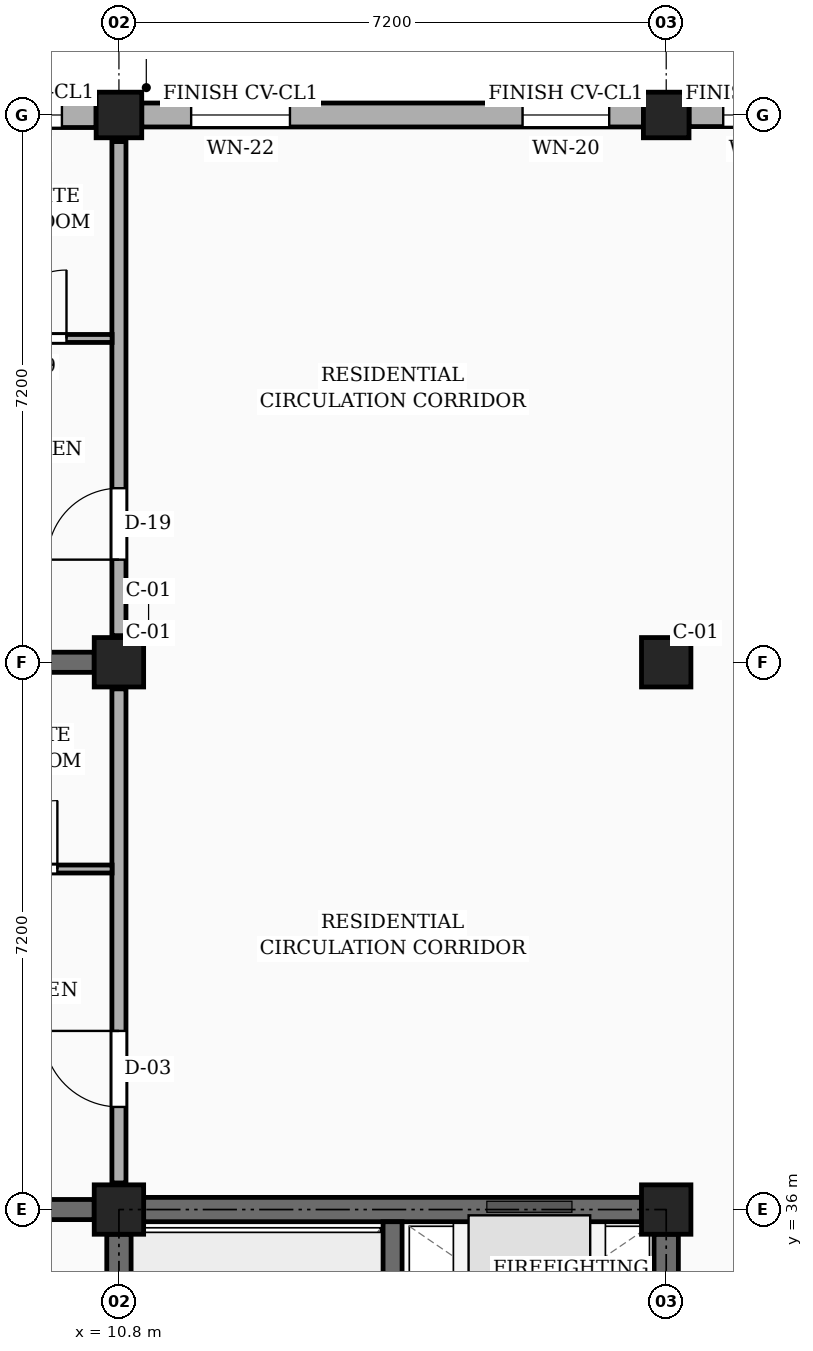
"""IFC4 building model, lengths in metres.
Left out: names, types, materials, properties, quantities, classifications, styles, units other than length and angle.
Written with IfcOpenShell. Run it as: python <this file> out.ifc"""

import sys

from ifc_helpers import new_model, si_unit, direction, frame, frame_2d, origin, origin_2d, place, context, subcontext, project, spatial, rectangle, extrude, element, fill, save


model = new_model("IFC4")
c1 = context("Model", 3, precision=1e-05, world=origin(), true_north=direction((0.0, 1.0)))
c2 = subcontext(c1, "Body", "Model", "MODEL_VIEW")
j1 = project(units=[si_unit("LENGTHUNIT", "METRE"), si_unit("PLANEANGLEUNIT", "RADIAN")], contexts=[c1])
p1 = place(None, origin())
s1 = spatial("IfcSite", under=j1, at=p1, CompositionType="ELEMENT")
p2 = place(p1, origin())
s2 = spatial("IfcBuilding", under=s1, at=p2, CompositionType="ELEMENT")
p3 = place(p2, origin())
s3 = spatial("IfcBuildingStorey", under=s2, at=p3, CompositionType="ELEMENT", Elevation=0.0)
for number, where, z_axis, x_axis in (
    (1, (10.8, 36.0, 0.0), (0.0, 0.0, 1.0), (1.0, 0.0, 0.0)),
    (2, (10.8, 43.2, 0.0), (0.0, 0.0, 1.0), (1.0, 0.0, 0.0)),
):
    element("IfcColumn", number, at=place(p3, frame(where, z_axis=z_axis, x_axis=x_axis)), inside=s3, PredefinedType="COLUMN", context=c2, shape_type="SweptSolid", body=[
        extrude(rectangle(XDim=0.65, YDim=0.65, at=origin_2d()), origin(), (0.0, 0.0, 1.0), 4.5),
    ])
p4 = place(p3, frame((10.8, 50.4, 0.0), z_axis=(0.0, 0.0, 1.0), x_axis=(1.0, 0.0, 0.0)))
e3 = element("IfcColumn", 3, at=p4, inside=s3, PredefinedType="COLUMN", context=c2, shape_type="SweptSolid", body=[
    extrude(rectangle(XDim=0.6, YDim=0.6, at=origin_2d()), origin(), (0.0, 0.0, 1.0), 4.5),
])
for number, where, z_axis, x_axis in (
    (4, (18.0, 36.0, 0.0), (0.0, 0.0, 1.0), (1.0, 0.0, 0.0)),
    (5, (18.0, 43.2, 0.0), (0.0, 0.0, 1.0), (1.0, 0.0, 0.0)),
):
    element("IfcColumn", number, at=place(p3, frame(where, z_axis=z_axis, x_axis=x_axis)), inside=s3, PredefinedType="COLUMN", context=c2, shape_type="SweptSolid", body=[
        extrude(rectangle(XDim=0.65, YDim=0.65, at=origin_2d()), origin(), (0.0, 0.0, 1.0), 4.5),
    ])
p5 = place(p3, frame((18.0, 50.4, 0.0), z_axis=(0.0, 0.0, 1.0), x_axis=(1.0, 0.0, 0.0)))
e6 = element("IfcColumn", 6, at=p5, inside=s3, PredefinedType="COLUMN", context=c2, shape_type="SweptSolid", body=[
    extrude(rectangle(XDim=0.6, YDim=0.6, at=origin_2d()), origin(), (0.0, 0.0, 1.0), 4.5),
])
for number, where, z_axis, x_axis in (
    (7, (3.9, 36.0, 0.0), (0.0, 0.0, 1.0), (1.0, 0.0, 0.0)),
    (8, (3.9, 43.2, 0.0), (0.0, 0.0, 1.0), (1.0, 0.0, 0.0)),
):
    element("IfcWall", number, at=place(p3, frame(where, z_axis=z_axis, x_axis=x_axis)), inside=s3, PredefinedType="SOLIDWALL", context=c2, shape_type="SweptSolid", body=[
        extrude(rectangle(XDim=6.575, YDim=0.265, at=frame_2d((3.288, 0.0))), origin(), (0.0, 0.0, 1.0), 3.52),
    ])
p6 = place(p3, frame((24.9, 50.4, 0.0), z_axis=(0.0, 0.0, 1.0), x_axis=(-1.0, 0.0, 0.0)))
e9 = element("IfcWall", 9, at=p6, inside=s3, PredefinedType="SOLIDWALL", context=c2, shape_type="SweptSolid", body=[
    extrude(rectangle(XDim=6.6, YDim=0.305, at=frame_2d((3.3, 0.0))), origin(), (0.0, 0.0, 1.0), 3.79),
])
p7 = place(p6, frame((2.61, 0.0, 0.78)))
e10 = element("IfcOpeningElement", 10, at=p7, cuts=e9, PredefinedType="OPENING", context=c2, shape_type="SweptSolid", body=[
    extrude(rectangle(XDim=0.98, YDim=1.36, at=frame_2d((0.49, 0.68))), frame((0.0, 0.163, 0.0), z_axis=(0.0, -1.0, 0.0), x_axis=(1.0, 0.0, 0.0)), (0.0, 0.0, 1.0), 0.325),
])
p8 = place(p6, frame((5.11, 0.0, 0.78)))
e11 = element("IfcOpeningElement", 11, at=p8, cuts=e9, PredefinedType="OPENING", context=c2, shape_type="SweptSolid", body=[
    extrude(rectangle(XDim=1.04, YDim=1.26, at=frame_2d((0.52, 0.63))), frame((0.0, 0.163, 0.0), z_axis=(0.0, -1.0, 0.0), x_axis=(1.0, 0.0, 0.0)), (0.0, 0.0, 1.0), 0.325),
])
p9 = place(p3, frame((17.7, 50.4, 0.0), z_axis=(0.0, 0.0, 1.0), x_axis=(-1.0, 0.0, 0.0)))
e12 = element("IfcWall", 12, at=p9, inside=s3, PredefinedType="SOLIDWALL", context=c2, shape_type="SweptSolid", body=[
    extrude(rectangle(XDim=6.6, YDim=0.315, at=frame_2d((3.3, 0.0))), origin(), (0.0, 0.0, 1.0), 3.79),
])
p10 = place(p9, frame((0.45, 0.0, 0.78)))
e13 = element("IfcOpeningElement", 13, at=p10, cuts=e12, PredefinedType="OPENING", context=c2, shape_type="SweptSolid", body=[
    extrude(rectangle(XDim=1.14, YDim=1.36, at=frame_2d((0.57, 0.68))), frame((0.0, 0.167, 0.0), z_axis=(0.0, -1.0, 0.0), x_axis=(1.0, 0.0, 0.0)), (0.0, 0.0, 1.0), 0.335),
])
p11 = place(p9, frame((4.65, 0.0, 0.78)))
e14 = element("IfcOpeningElement", 14, at=p11, cuts=e12, PredefinedType="OPENING", context=c2, shape_type="SweptSolid", body=[
    extrude(rectangle(XDim=1.3, YDim=1.36, at=frame_2d((0.65, 0.68))), frame((0.0, 0.167, 0.0), z_axis=(0.0, -1.0, 0.0), x_axis=(1.0, 0.0, 0.0)), (0.0, 0.0, 1.0), 0.335),
])
p12 = place(p3, frame((10.5, 50.4, 0.0), z_axis=(0.0, 0.0, 1.0), x_axis=(-1.0, 0.0, 0.0)))
e15 = element("IfcWall", 15, at=p12, inside=s3, PredefinedType="SOLIDWALL", context=c2, shape_type="SweptSolid", body=[
    extrude(rectangle(XDim=6.64, YDim=0.33, at=frame_2d((3.32, 0.0))), origin(), (0.0, 0.0, 1.0), 3.79),
])
p13 = place(p12, frame((0.45, 0.0, 0.78)))
e16 = element("IfcOpeningElement", 16, at=p13, cuts=e15, PredefinedType="OPENING", context=c2, shape_type="SweptSolid", body=[
    extrude(rectangle(XDim=1.2, YDim=1.26, at=frame_2d((0.6, 0.63))), frame((0.0, 0.175, 0.0), z_axis=(0.0, -1.0, 0.0), x_axis=(1.0, 0.0, 0.0)), (0.0, 0.0, 1.0), 0.35),
])
p14 = place(p12, frame((3.5, 0.0, 0.78)))
e17 = element("IfcOpeningElement", 17, at=p14, cuts=e15, PredefinedType="OPENING", context=c2, shape_type="SweptSolid", body=[
    extrude(rectangle(XDim=1.46, YDim=1.36, at=frame_2d((0.73, 0.68))), frame((0.0, 0.175, 0.0), z_axis=(0.0, -1.0, 0.0), x_axis=(1.0, 0.0, 0.0)), (0.0, 0.0, 1.0), 0.35),
])
for number, where, z_axis, x_axis in (
    (18, (10.8, 29.125, 0.0), (0.0, 0.0, 1.0), (0.0, 1.0, 0.0)),
    (19, (11.125, 36.0, 0.0), (0.0, 0.0, 1.0), (1.0, 0.0, 0.0)),
):
    element("IfcWall", number, at=place(p3, frame(where, z_axis=z_axis, x_axis=x_axis)), inside=s3, PredefinedType="SHEAR", context=c2, shape_type="SweptSolid", body=[
        extrude(rectangle(XDim=6.55, YDim=0.32, at=frame_2d((3.275, 0.0))), origin(), (0.0, 0.0, 1.0), 4.22),
    ])
p15 = place(p3, frame((18.0, 29.125, 0.0), z_axis=(0.0, 0.0, 1.0), x_axis=(0.0, 1.0, 0.0)))
e20 = element("IfcWall", 20, at=p15, inside=s3, PredefinedType="SHEAR", context=c2, shape_type="SweptSolid", body=[
    extrude(rectangle(XDim=6.55, YDim=0.32, at=frame_2d((3.275, 0.0))), origin(), (0.0, 0.0, 1.0), 4.22),
])
p16 = place(p15, frame((1.5, 0.0, 0.0)))
e21 = element("IfcOpeningElement", 21, at=p16, cuts=e20, PredefinedType="OPENING", context=c2, shape_type="SweptSolid", body=[
    extrude(rectangle(XDim=1.1, YDim=2.15, at=frame_2d((0.55, 1.075))), frame((0.0, 0.17, 0.0), z_axis=(0.0, -1.0, 0.0), x_axis=(1.0, 0.0, 0.0)), (0.0, 0.0, 1.0), 0.34),
])
p17 = place(p3, frame((14.4, 28.96, 0.0), z_axis=(0.0, 0.0, 1.0), x_axis=(0.0, 1.0, 0.0)))
e22 = element("IfcWall", 22, at=p17, inside=s3, PredefinedType="SHEAR", context=c2, shape_type="SweptSolid", body=[
    extrude(rectangle(XDim=6.88, YDim=0.25, at=frame_2d((3.44, 0.0))), origin(), (0.0, 0.0, 1.0), 4.22),
])
p18 = place(p17, frame((0.44, 0.0, 0.0)))
e23 = element("IfcOpeningElement", 23, at=p18, cuts=e22, PredefinedType="OPENING", context=c2, shape_type="SweptSolid", body=[
    extrude(rectangle(XDim=1.05, YDim=2.15, at=frame_2d((0.525, 1.075))), frame((0.0, 0.135, 0.0), z_axis=(0.0, -1.0, 0.0), x_axis=(1.0, 0.0, 0.0)), (0.0, 0.0, 1.0), 0.27),
])
p19 = place(p3, frame((10.8, 36.35, 0.0), z_axis=(0.0, 0.0, 1.0), x_axis=(0.0, 1.0, 0.0)))
e24 = element("IfcWall", 24, at=p19, inside=s3, PredefinedType="PARTITIONING", context=c2, shape_type="SweptSolid", body=[
    extrude(rectangle(XDim=6.5, YDim=0.185, at=frame_2d((3.25, 0.0))), origin(), (0.0, 0.0, 1.0), 3.47),
])
p20 = place(p19, frame((1.0, 0.0, 0.0)))
e25 = element("IfcOpeningElement", 25, at=p20, cuts=e24, PredefinedType="OPENING", context=c2, shape_type="SweptSolid", body=[
    extrude(rectangle(XDim=1.0, YDim=2.15, at=frame_2d((0.5, 1.075))), frame((0.0, 0.103, 0.0), z_axis=(0.0, -1.0, 0.0), x_axis=(1.0, 0.0, 0.0)), (0.0, 0.0, 1.0), 0.205),
])
p21 = place(p3, frame((10.8, 43.55, 0.0), z_axis=(0.0, 0.0, 1.0), x_axis=(0.0, 1.0, 0.0)))
e26 = element("IfcWall", 26, at=p21, inside=s3, PredefinedType="PARTITIONING", context=c2, shape_type="SweptSolid", body=[
    extrude(rectangle(XDim=6.5, YDim=0.185, at=frame_2d((3.25, 0.0))), origin(), (0.0, 0.0, 1.0), 3.47),
])
p22 = place(p21, frame((1.0, 0.0, 0.0)))
e27 = element("IfcOpeningElement", 27, at=p22, cuts=e26, PredefinedType="OPENING", context=c2, shape_type="SweptSolid", body=[
    extrude(rectangle(XDim=0.94, YDim=2.12, at=frame_2d((0.47, 1.06))), frame((0.0, 0.103, 0.0), z_axis=(0.0, -1.0, 0.0), x_axis=(1.0, 0.0, 0.0)), (0.0, 0.0, 1.0), 0.205),
])
p23 = place(p3, frame((8.37, 40.48, 0.0), z_axis=(0.0, 0.0, 1.0), x_axis=(1.0, 0.0, 0.0)))
e28 = element("IfcWall", 28, at=p23, inside=s3, PredefinedType="PARTITIONING", context=c2, shape_type="SweptSolid", body=[
    extrude(rectangle(XDim=2.34, YDim=0.105, at=frame_2d((1.17, 0.0))), origin(), (0.0, 0.0, 1.0), 3.655),
])
p24 = place(p23, frame((0.72, 0.0, 0.0)))
e29 = element("IfcOpeningElement", 29, at=p24, cuts=e28, PredefinedType="OPENING", context=c2, shape_type="SweptSolid", body=[
    extrude(rectangle(XDim=0.9, YDim=2.05, at=frame_2d((0.45, 1.025))), frame((0.0, 0.062, 0.0), z_axis=(0.0, -1.0, 0.0), x_axis=(1.0, 0.0, 0.0)), (0.0, 0.0, 1.0), 0.125),
])
p25 = place(p3, frame((8.61, 47.46, 0.0), z_axis=(0.0, 0.0, 1.0), x_axis=(1.0, 0.0, 0.0)))
e30 = element("IfcWall", 30, at=p25, inside=s3, PredefinedType="PARTITIONING", context=c2, shape_type="SweptSolid", body=[
    extrude(rectangle(XDim=2.1, YDim=0.105, at=frame_2d((1.05, 0.0))), origin(), (0.0, 0.0, 1.0), 3.655),
])
p26 = place(p25, frame((0.6, 0.0, 0.0)))
e31 = element("IfcOpeningElement", 31, at=p26, cuts=e30, PredefinedType="OPENING", context=c2, shape_type="SweptSolid", body=[
    extrude(rectangle(XDim=0.9, YDim=2.05, at=frame_2d((0.45, 1.025))), frame((0.0, 0.062, 0.0), z_axis=(0.0, -1.0, 0.0), x_axis=(1.0, 0.0, 0.0)), (0.0, 0.0, 1.0), 0.125),
])
p27 = place(p8, origin())
e32 = element("IfcWindow", 32, at=p27, inside=s3, PartitioningType="SINGLE_PANEL", PredefinedType="WINDOW", context=c2, shape_type="SweptSolid", body=[
    extrude(rectangle(XDim=1.04, YDim=1.26, at=frame_2d((0.52, 0.63))), frame((0.0, 0.03, 0.0), z_axis=(0.0, -1.0, 0.0), x_axis=(1.0, 0.0, 0.0)), (0.0, 0.0, 1.0), 0.06),
])
fill(e11, e32)
p28 = place(p10, origin())
e33 = element("IfcWindow", 33, at=p28, inside=s3, PartitioningType="SINGLE_PANEL", PredefinedType="WINDOW", context=c2, shape_type="SweptSolid", body=[
    extrude(rectangle(XDim=1.14, YDim=1.36, at=frame_2d((0.57, 0.68))), frame((0.0, 0.03, 0.0), z_axis=(0.0, -1.0, 0.0), x_axis=(1.0, 0.0, 0.0)), (0.0, 0.0, 1.0), 0.06),
])
fill(e13, e33)
p29 = place(p11, origin())
e34 = element("IfcWindow", 34, at=p29, inside=s3, PartitioningType="SINGLE_PANEL", PredefinedType="WINDOW", context=c2, shape_type="SweptSolid", body=[
    extrude(rectangle(XDim=1.3, YDim=1.36, at=frame_2d((0.65, 0.68))), frame((0.0, 0.03, 0.0), z_axis=(0.0, -1.0, 0.0), x_axis=(1.0, 0.0, 0.0)), (0.0, 0.0, 1.0), 0.06),
])
fill(e14, e34)
p30 = place(p13, origin())
e35 = element("IfcWindow", 35, at=p30, inside=s3, PartitioningType="SINGLE_PANEL", PredefinedType="WINDOW", context=c2, shape_type="SweptSolid", body=[
    extrude(rectangle(XDim=1.2, YDim=1.26, at=frame_2d((0.6, 0.63))), frame((0.0, 0.03, 0.0), z_axis=(0.0, -1.0, 0.0), x_axis=(1.0, 0.0, 0.0)), (0.0, 0.0, 1.0), 0.06),
])
fill(e16, e35)
p31 = place(p20, origin())
e36 = element("IfcDoor", 36, at=p31, inside=s3, OperationType="SINGLE_SWING_RIGHT", PredefinedType="DOOR", context=c2, shape_type="SweptSolid", body=[
    extrude(rectangle(XDim=1.0, YDim=2.15, at=frame_2d((0.5, 1.075))), frame((0.0, 0.025, 0.0), z_axis=(0.0, -1.0, 0.0), x_axis=(1.0, 0.0, 0.0)), (0.0, 0.0, 1.0), 0.05),
])
fill(e25, e36)
p32 = place(p22, origin())
e37 = element("IfcDoor", 37, at=p32, inside=s3, OperationType="SINGLE_SWING_LEFT", PredefinedType="DOOR", context=c2, shape_type="SweptSolid", body=[
    extrude(rectangle(XDim=0.94, YDim=2.12, at=frame_2d((0.47, 1.06))), frame((0.0, 0.025, 0.0), z_axis=(0.0, -1.0, 0.0), x_axis=(1.0, 0.0, 0.0)), (0.0, 0.0, 1.0), 0.05),
])
fill(e27, e37)
p33 = place(p24, origin())
e38 = element("IfcDoor", 38, at=p33, inside=s3, OperationType="SINGLE_SWING_RIGHT", PredefinedType="DOOR", context=c2, shape_type="SweptSolid", body=[
    extrude(rectangle(XDim=0.9, YDim=2.05, at=frame_2d((0.45, 1.025))), frame((0.0, 0.025, 0.0), z_axis=(0.0, -1.0, 0.0), x_axis=(1.0, 0.0, 0.0)), (0.0, 0.0, 1.0), 0.05),
])
fill(e29, e38)
p34 = place(p26, origin())
e39 = element("IfcDoor", 39, at=p34, inside=s3, OperationType="SINGLE_SWING_RIGHT", PredefinedType="DOOR", context=c2, shape_type="SweptSolid", body=[
    extrude(rectangle(XDim=0.9, YDim=2.05, at=frame_2d((0.45, 1.025))), frame((0.0, 0.025, 0.0), z_axis=(0.0, -1.0, 0.0), x_axis=(1.0, 0.0, 0.0)), (0.0, 0.0, 1.0), 0.05),
])
fill(e31, e39)
save(model, sys.argv[1])
